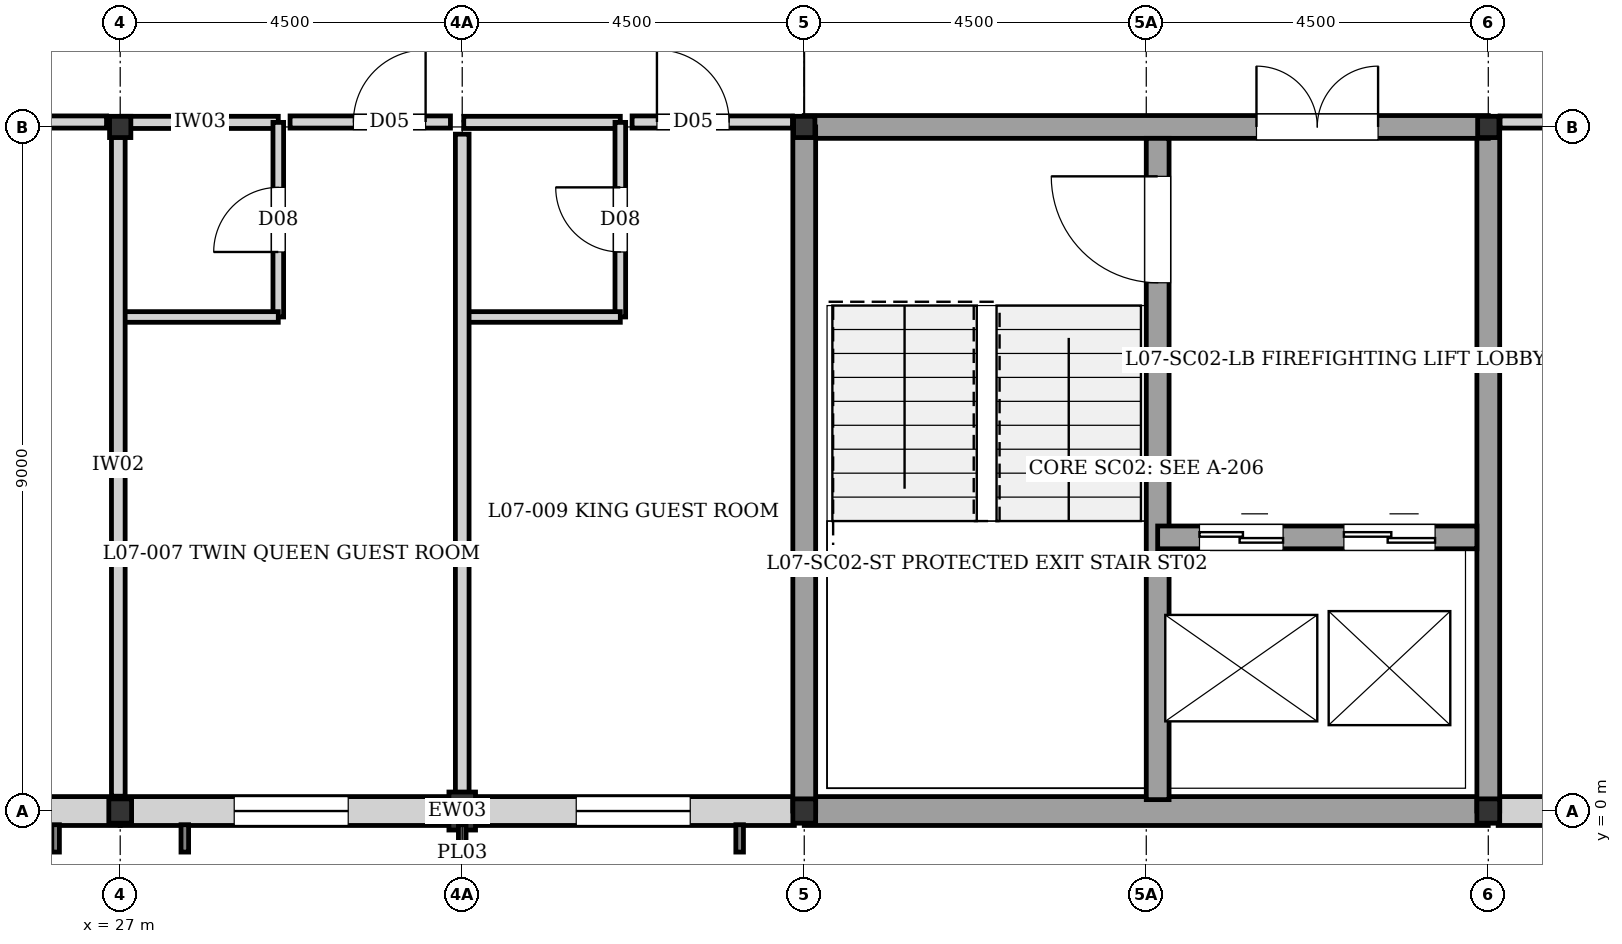
"""IFC4 building model, lengths in metres.
Left out: names, types, materials, properties, quantities, classifications, styles, units other than length and angle.
Written with IfcOpenShell. Run it as: python <this file> out.ifc"""

import sys

from ifc_helpers import new_model, si_unit, direction, frame, frame_2d, origin, origin_2d, place, context, subcontext, project, spatial, rectangle, i_section, extrude, element, fill, save


model = new_model("IFC4")
c1 = context("Model", 3, precision=1e-05, world=origin(), true_north=direction((0.0, 1.0)))
c2 = subcontext(c1, "Body", "Model", "MODEL_VIEW")
j1 = project(units=[si_unit("LENGTHUNIT", "METRE"), si_unit("PLANEANGLEUNIT", "RADIAN")], contexts=[c1])
p1 = place(None, origin())
s1 = spatial("IfcSite", under=j1, at=p1, CompositionType="ELEMENT")
p2 = place(p1, origin())
s2 = spatial("IfcBuilding", under=s1, at=p2, CompositionType="ELEMENT")
p3 = place(p2, frame((0.0, 0.0, 23.68)))
s3 = spatial("IfcBuildingStorey", under=s2, at=p3, CompositionType="ELEMENT", Elevation=23.68)
p4 = place(p3, frame((27.0, 0.0, 0.0), z_axis=(0.0, 0.0, 1.0), x_axis=(1.0, 0.0, 0.0)))
e1 = element("IfcColumn", 1, at=p4, inside=s3, PredefinedType="COLUMN", context=c2, shape_type="SweptSolid", body=[
    extrude(i_section(OverallWidth=0.3, OverallDepth=0.32, WebThickness=0.011, FlangeThickness=0.021, at=origin_2d()), origin(), (0.0, 0.0, 1.0), 3.2),
])
p5 = place(p3, frame((27.0, 9.0, 0.0), z_axis=(0.0, 0.0, 1.0), x_axis=(1.0, 0.0, 0.0)))
e2 = element("IfcColumn", 2, at=p5, inside=s3, PredefinedType="COLUMN", context=c2, shape_type="SweptSolid", body=[
    extrude(i_section(OverallWidth=0.28, OverallDepth=0.28, WebThickness=0.01, FlangeThickness=0.018, at=origin_2d()), origin(), (0.0, 0.0, 1.0), 3.2),
])
p6 = place(p3, frame((36.0, 0.0, 0.0), z_axis=(0.0, 0.0, 1.0), x_axis=(1.0, 0.0, 0.0)))
e3 = element("IfcColumn", 3, at=p6, inside=s3, PredefinedType="COLUMN", context=c2, shape_type="SweptSolid", body=[
    extrude(i_section(OverallWidth=0.3, OverallDepth=0.32, WebThickness=0.011, FlangeThickness=0.021, at=origin_2d()), origin(), (0.0, 0.0, 1.0), 3.2),
])
p7 = place(p3, frame((36.0, 9.0, 0.0), z_axis=(0.0, 0.0, 1.0), x_axis=(1.0, 0.0, 0.0)))
e4 = element("IfcColumn", 4, at=p7, inside=s3, PredefinedType="COLUMN", context=c2, shape_type="SweptSolid", body=[
    extrude(i_section(OverallWidth=0.28, OverallDepth=0.28, WebThickness=0.01, FlangeThickness=0.018, at=origin_2d()), origin(), (0.0, 0.0, 1.0), 3.2),
])
p8 = place(p3, frame((45.0, 0.0, 0.0), z_axis=(0.0, 0.0, 1.0), x_axis=(1.0, 0.0, 0.0)))
e5 = element("IfcColumn", 5, at=p8, inside=s3, PredefinedType="COLUMN", context=c2, shape_type="SweptSolid", body=[
    extrude(i_section(OverallWidth=0.3, OverallDepth=0.32, WebThickness=0.011, FlangeThickness=0.021, at=origin_2d()), origin(), (0.0, 0.0, 1.0), 3.2),
])
p9 = place(p3, frame((45.0, 9.0, 0.0), z_axis=(0.0, 0.0, 1.0), x_axis=(1.0, 0.0, 0.0)))
e6 = element("IfcColumn", 6, at=p9, inside=s3, PredefinedType="COLUMN", context=c2, shape_type="SweptSolid", body=[
    extrude(i_section(OverallWidth=0.28, OverallDepth=0.28, WebThickness=0.01, FlangeThickness=0.018, at=origin_2d()), origin(), (0.0, 0.0, 1.0), 3.2),
])
p10 = place(p3, frame((31.5, 0.0, 0.0), z_axis=(0.0, 0.0, 1.0), x_axis=(1.0, 0.0, 0.0)))
e7 = element("IfcColumn", 7, at=p10, inside=s3, PredefinedType="PILASTER", context=c2, shape_type="SweptSolid", body=[
    extrude(rectangle(XDim=0.35, YDim=0.5, at=origin_2d()), origin(), (0.0, 0.0, 1.0), 3.2),
])
p11 = place(p3, frame((54.0, 0.0, 0.0), z_axis=(0.0, 0.0, 1.0), x_axis=(-1.0, 0.0, 0.0)))
e8 = element("IfcWall", 8, at=p11, inside=s3, PredefinedType="SOLIDWALL", context=c2, shape_type="SweptSolid", body=[
    extrude(rectangle(XDim=8.87, YDim=0.38, at=frame_2d((4.435, 0.0))), origin(), (0.0, 0.0, 1.0), 2.6),
])
p12 = place(p11, frame((1.5, 0.0, 0.35)))
e9 = element("IfcOpeningElement", 9, at=p12, cuts=e8, PredefinedType="OPENING", context=c2, shape_type="SweptSolid", body=[
    extrude(rectangle(XDim=1.5, YDim=1.8, at=frame_2d((0.75, 0.9))), frame((0.0, 0.2, 0.0), z_axis=(0.0, -1.0, 0.0), x_axis=(1.0, 0.0, 0.0)), (0.0, 0.0, 1.0), 0.4),
])
p13 = place(p11, frame((6.0, 0.0, 0.35)))
e10 = element("IfcOpeningElement", 10, at=p13, cuts=e8, PredefinedType="OPENING", context=c2, shape_type="SweptSolid", body=[
    extrude(rectangle(XDim=1.5, YDim=1.8, at=frame_2d((0.75, 0.9))), frame((0.0, 0.2, 0.0), z_axis=(0.0, -1.0, 0.0), x_axis=(1.0, 0.0, 0.0)), (0.0, 0.0, 1.0), 0.4),
])
p14 = place(p3, frame((45.0, 0.0, 0.0), z_axis=(0.0, 0.0, 1.0), x_axis=(-1.0, 0.0, 0.0)))
e11 = element("IfcWall", 11, at=p14, inside=s3, PredefinedType="SOLIDWALL", context=c2, shape_type="SweptSolid", body=[
    extrude(rectangle(XDim=9.0, YDim=0.38, at=frame_2d((4.5, 0.0))), origin(), (0.0, 0.0, 1.0), 2.96),
])
p15 = place(p3, frame((35.87, 0.0, 0.0), z_axis=(0.0, 0.0, 1.0), x_axis=(-1.0, 0.0, 0.0)))
e12 = element("IfcWall", 12, at=p15, inside=s3, PredefinedType="SOLIDWALL", context=c2, shape_type="SweptSolid", body=[
    extrude(rectangle(XDim=8.87, YDim=0.38, at=frame_2d((4.435, 0.0))), origin(), (0.0, 0.0, 1.0), 2.73),
])
p16 = place(p15, frame((1.37, 0.0, 0.35)))
e13 = element("IfcOpeningElement", 13, at=p16, cuts=e12, PredefinedType="OPENING", context=c2, shape_type="SweptSolid", body=[
    extrude(rectangle(XDim=1.5, YDim=1.8, at=frame_2d((0.75, 0.9))), frame((0.0, 0.2, 0.0), z_axis=(0.0, -1.0, 0.0), x_axis=(1.0, 0.0, 0.0)), (0.0, 0.0, 1.0), 0.4),
])
p17 = place(p15, frame((5.87, 0.0, 0.35)))
e14 = element("IfcOpeningElement", 14, at=p17, cuts=e12, PredefinedType="OPENING", context=c2, shape_type="SweptSolid", body=[
    extrude(rectangle(XDim=1.5, YDim=1.8, at=frame_2d((0.75, 0.9))), frame((0.0, 0.2, 0.0), z_axis=(0.0, -1.0, 0.0), x_axis=(1.0, 0.0, 0.0)), (0.0, 0.0, 1.0), 0.4),
])
p18 = place(p3, frame((27.0, 0.0, 0.0), z_axis=(0.0, 0.0, 1.0), x_axis=(-1.0, 0.0, 0.0)))
e15 = element("IfcWall", 15, at=p18, inside=s3, PredefinedType="SOLIDWALL", context=c2, shape_type="SweptSolid", body=[
    extrude(rectangle(XDim=8.87, YDim=0.38, at=frame_2d((4.435, 0.0))), origin(), (0.0, 0.0, 1.0), 2.56),
])
p19 = place(p18, frame((1.5, 0.0, 0.35)))
e16 = element("IfcOpeningElement", 16, at=p19, cuts=e15, PredefinedType="OPENING", context=c2, shape_type="SweptSolid", body=[
    extrude(rectangle(XDim=1.5, YDim=1.8, at=frame_2d((0.75, 0.9))), frame((0.0, 0.2, 0.0), z_axis=(0.0, -1.0, 0.0), x_axis=(1.0, 0.0, 0.0)), (0.0, 0.0, 1.0), 0.4),
])
p20 = place(p18, frame((6.0, 0.0, 0.35)))
e17 = element("IfcOpeningElement", 17, at=p20, cuts=e15, PredefinedType="OPENING", context=c2, shape_type="SweptSolid", body=[
    extrude(rectangle(XDim=1.5, YDim=1.8, at=frame_2d((0.75, 0.9))), frame((0.0, 0.2, 0.0), z_axis=(0.0, -1.0, 0.0), x_axis=(1.0, 0.0, 0.0)), (0.0, 0.0, 1.0), 0.4),
])
p21 = place(p3, frame((45.0, 0.0, 0.0), z_axis=(0.0, 0.0, 1.0), x_axis=(0.0, 1.0, 0.0)))
e18 = element("IfcWall", 18, at=p21, inside=s3, PredefinedType="SHEAR", context=c2, shape_type="SweptSolid", body=[
    extrude(rectangle(XDim=9.0, YDim=0.3, at=frame_2d((4.5, 0.0))), origin(), (0.0, 0.0, 1.0), 2.96),
])
p22 = place(p3, frame((36.0, 9.0, 0.0), z_axis=(0.0, 0.0, 1.0), x_axis=(1.0, 0.0, 0.0)))
e19 = element("IfcWall", 19, at=p22, inside=s3, PredefinedType="SHEAR", context=c2, shape_type="SweptSolid", body=[
    extrude(rectangle(XDim=9.0, YDim=0.3, at=frame_2d((4.5, 0.0))), origin(), (0.0, 0.0, 1.0), 2.96),
])
p23 = place(p22, frame((5.95, 0.0, 0.0)))
e20 = element("IfcOpeningElement", 20, at=p23, cuts=e19, PredefinedType="OPENING", context=c2, shape_type="SweptSolid", body=[
    extrude(rectangle(XDim=1.6, YDim=2.1, at=frame_2d((0.8, 1.05))), frame((0.0, 0.16, 0.0), z_axis=(0.0, -1.0, 0.0), x_axis=(1.0, 0.0, 0.0)), (0.0, 0.0, 1.0), 0.32),
])
p24 = place(p3, frame((36.0, 0.0, 0.0), z_axis=(0.0, 0.0, 1.0), x_axis=(0.0, 1.0, 0.0)))
e21 = element("IfcWall", 21, at=p24, inside=s3, PredefinedType="SHEAR", context=c2, shape_type="SweptSolid", body=[
    extrude(rectangle(XDim=9.0, YDim=0.3, at=frame_2d((4.5, 0.0))), origin(), (0.0, 0.0, 1.0), 2.96),
])
p25 = place(p3, frame((40.65, 0.15, 0.0), z_axis=(0.0, 0.0, 1.0), x_axis=(0.0, 1.0, 0.0)))
e22 = element("IfcWall", 22, at=p25, inside=s3, PredefinedType="SHEAR", context=c2, shape_type="SweptSolid", body=[
    extrude(rectangle(XDim=8.7, YDim=0.3, at=frame_2d((4.35, 0.0))), origin(), (0.0, 0.0, 1.0), 2.96),
])
p26 = place(p25, frame((6.8, 0.0, 0.0)))
e23 = element("IfcOpeningElement", 23, at=p26, cuts=e22, PredefinedType="OPENING", context=c2, shape_type="SweptSolid", body=[
    extrude(rectangle(XDim=1.4, YDim=2.02, at=frame_2d((0.7, 1.01))), frame((0.0, 0.16, 0.0), z_axis=(0.0, -1.0, 0.0), x_axis=(1.0, 0.0, 0.0)), (0.0, 0.0, 1.0), 0.32),
])
p27 = place(p3, frame((40.65, 3.6, 0.0), z_axis=(0.0, 0.0, 1.0), x_axis=(1.0, 0.0, 0.0)))
e24 = element("IfcWall", 24, at=p27, inside=s3, PredefinedType="SHEAR", context=c2, shape_type="SweptSolid", body=[
    extrude(rectangle(XDim=4.2, YDim=0.3, at=frame_2d((2.1, 0.0))), origin(), (0.0, 0.0, 1.0), 2.96),
])
p28 = place(p27, frame((0.55, 0.0, 0.0)))
e25 = element("IfcOpeningElement", 25, at=p28, cuts=e24, PredefinedType="OPENING", context=c2, shape_type="SweptSolid", body=[
    extrude(rectangle(XDim=1.1, YDim=2.1, at=frame_2d((0.55, 1.05))), frame((0.0, 0.16, 0.0), z_axis=(0.0, -1.0, 0.0), x_axis=(1.0, 0.0, 0.0)), (0.0, 0.0, 1.0), 0.32),
])
p29 = place(p27, frame((2.45, 0.0, 0.0)))
e26 = element("IfcOpeningElement", 26, at=p29, cuts=e24, PredefinedType="OPENING", context=c2, shape_type="SweptSolid", body=[
    extrude(rectangle(XDim=1.2, YDim=2.2, at=frame_2d((0.6, 1.1))), frame((0.0, 0.16, 0.0), z_axis=(0.0, -1.0, 0.0), x_axis=(1.0, 0.0, 0.0)), (0.0, 0.0, 1.0), 0.32),
])
p30 = place(p3, frame((27.02, 9.06, 0.0), z_axis=(0.0, 0.0, 1.0), x_axis=(1.0, 0.0, 0.0)))
e27 = element("IfcWall", 27, at=p30, inside=s3, PredefinedType="PARTITIONING", context=c2, shape_type="SweptSolid", body=[
    extrude(rectangle(XDim=2.06, YDim=0.16, at=frame_2d((1.03, 0.0))), origin(), (0.0, 0.0, 1.0), 2.56),
])
p31 = place(p3, frame((29.08, 6.5, 0.0), z_axis=(0.0, 0.0, 1.0), x_axis=(0.0, 1.0, 0.0)))
e28 = element("IfcWall", 28, at=p31, inside=s3, PredefinedType="PLUMBINGWALL", context=c2, shape_type="SweptSolid", body=[
    extrude(rectangle(XDim=2.56, YDim=0.14, at=frame_2d((1.28, 0.0))), origin(), (0.0, 0.0, 1.0), 2.96),
])
p32 = place(p31, frame((0.855, 0.0, 0.0)))
e29 = element("IfcOpeningElement", 29, at=p32, cuts=e28, PredefinedType="OPENING", context=c2, shape_type="SweptSolid", body=[
    extrude(rectangle(XDim=0.85, YDim=2.04, at=frame_2d((0.425, 1.02))), frame((0.0, 0.08, 0.0), z_axis=(0.0, -1.0, 0.0), x_axis=(1.0, 0.0, 0.0)), (0.0, 0.0, 1.0), 0.16),
])
p33 = place(p3, frame((27.02, 6.5, 0.0), z_axis=(0.0, 0.0, 1.0), x_axis=(1.0, 0.0, 0.0)))
e30 = element("IfcWall", 30, at=p33, inside=s3, PredefinedType="PLUMBINGWALL", context=c2, shape_type="SweptSolid", body=[
    extrude(rectangle(XDim=2.06, YDim=0.14, at=frame_2d((1.03, 0.0))), origin(), (0.0, 0.0, 1.0), 2.96),
])
p34 = place(p3, frame((31.52, 9.06, 0.0), z_axis=(0.0, 0.0, 1.0), x_axis=(1.0, 0.0, 0.0)))
e31 = element("IfcWall", 31, at=p34, inside=s3, PredefinedType="PARTITIONING", context=c2, shape_type="SweptSolid", body=[
    extrude(rectangle(XDim=2.06, YDim=0.16, at=frame_2d((1.03, 0.0))), origin(), (0.0, 0.0, 1.0), 2.56),
])
p35 = place(p3, frame((33.58, 6.5, 0.0), z_axis=(0.0, 0.0, 1.0), x_axis=(0.0, 1.0, 0.0)))
e32 = element("IfcWall", 32, at=p35, inside=s3, PredefinedType="PLUMBINGWALL", context=c2, shape_type="SweptSolid", body=[
    extrude(rectangle(XDim=2.56, YDim=0.14, at=frame_2d((1.28, 0.0))), origin(), (0.0, 0.0, 1.0), 2.96),
])
p36 = place(p35, frame((0.855, 0.0, 0.0)))
e33 = element("IfcOpeningElement", 33, at=p36, cuts=e32, PredefinedType="OPENING", context=c2, shape_type="SweptSolid", body=[
    extrude(rectangle(XDim=0.85, YDim=2.04, at=frame_2d((0.425, 1.02))), frame((0.0, 0.08, 0.0), z_axis=(0.0, -1.0, 0.0), x_axis=(1.0, 0.0, 0.0)), (0.0, 0.0, 1.0), 0.16),
])
p37 = place(p3, frame((31.52, 6.5, 0.0), z_axis=(0.0, 0.0, 1.0), x_axis=(1.0, 0.0, 0.0)))
e34 = element("IfcWall", 34, at=p37, inside=s3, PredefinedType="PLUMBINGWALL", context=c2, shape_type="SweptSolid", body=[
    extrude(rectangle(XDim=2.06, YDim=0.14, at=frame_2d((1.03, 0.0))), origin(), (0.0, 0.0, 1.0), 2.96),
])
p38 = place(p3, frame((26.975, 0.195, 0.0), z_axis=(0.0, 0.0, 1.0), x_axis=(0.0, 1.0, 0.0)))
e35 = element("IfcWall", 35, at=p38, inside=s3, PredefinedType="PARTITIONING", context=c2, shape_type="SweptSolid", body=[
    extrude(rectangle(XDim=8.71, YDim=0.18, at=frame_2d((4.355, 0.0))), origin(), (0.0, 0.0, 1.0), 2.37),
])
p39 = place(p3, frame((31.5, 0.195, 0.0), z_axis=(0.0, 0.0, 1.0), x_axis=(0.0, 1.0, 0.0)))
e36 = element("IfcWall", 36, at=p39, inside=s3, PredefinedType="PARTITIONING", context=c2, shape_type="SweptSolid", body=[
    extrude(rectangle(XDim=8.71, YDim=0.18, at=frame_2d((4.355, 0.0))), origin(), (0.0, 0.0, 1.0), 2.96),
])
p40 = place(p3, frame((20.285, 9.065, 0.0), z_axis=(0.0, 0.0, 1.0), x_axis=(1.0, 0.0, 0.0)))
e37 = element("IfcWall", 37, at=p40, inside=s3, PredefinedType="PARTITIONING", context=c2, shape_type="SweptSolid", body=[
    extrude(rectangle(XDim=6.535, YDim=0.16, at=frame_2d((3.268, 0.0))), origin(), (0.0, 0.0, 1.0), 2.6),
])
p41 = place(p40, frame((1.75, 0.0, 0.0)))
e38 = element("IfcOpeningElement", 38, at=p41, cuts=e37, PredefinedType="OPENING", context=c2, shape_type="SweptSolid", body=[
    extrude(rectangle(XDim=1.3, YDim=2.25, at=frame_2d((0.65, 1.125))), frame((0.0, 0.09, 0.0), z_axis=(0.0, -1.0, 0.0), x_axis=(1.0, 0.0, 0.0)), (0.0, 0.0, 1.0), 0.18),
])
p42 = place(p3, frame((29.235, 9.065, 0.0), z_axis=(0.0, 0.0, 1.0), x_axis=(1.0, 0.0, 0.0)))
e39 = element("IfcWall", 39, at=p42, inside=s3, PredefinedType="PARTITIONING", context=c2, shape_type="SweptSolid", body=[
    extrude(rectangle(XDim=2.11, YDim=0.16, at=frame_2d((1.055, 0.0))), origin(), (0.0, 0.0, 1.0), 2.56),
])
p43 = place(p42, frame((0.833, 0.0, 0.0)))
e40 = element("IfcOpeningElement", 40, at=p43, cuts=e39, PredefinedType="OPENING", context=c2, shape_type="SweptSolid", body=[
    extrude(rectangle(XDim=0.95, YDim=2.15, at=frame_2d((0.475, 1.075))), frame((0.0, 0.09, 0.0), z_axis=(0.0, -1.0, 0.0), x_axis=(1.0, 0.0, 0.0)), (0.0, 0.0, 1.0), 0.18),
])
p44 = place(p3, frame((33.735, 9.065, 0.0), z_axis=(0.0, 0.0, 1.0), x_axis=(1.0, 0.0, 0.0)))
e41 = element("IfcWall", 41, at=p44, inside=s3, PredefinedType="PARTITIONING", context=c2, shape_type="SweptSolid", body=[
    extrude(rectangle(XDim=2.11, YDim=0.16, at=frame_2d((1.055, 0.0))), origin(), (0.0, 0.0, 1.0), 2.56),
])
p45 = place(p44, frame((0.327, 0.0, 0.0)))
e42 = element("IfcOpeningElement", 42, at=p45, cuts=e41, PredefinedType="OPENING", context=c2, shape_type="SweptSolid", body=[
    extrude(rectangle(XDim=0.95, YDim=2.15, at=frame_2d((0.475, 1.075))), frame((0.0, 0.09, 0.0), z_axis=(0.0, -1.0, 0.0), x_axis=(1.0, 0.0, 0.0)), (0.0, 0.0, 1.0), 0.18),
])
p46 = place(p3, frame((45.155, 9.065, 0.0), z_axis=(0.0, 0.0, 1.0), x_axis=(1.0, 0.0, 0.0)))
e43 = element("IfcWall", 43, at=p46, inside=s3, PredefinedType="PARTITIONING", context=c2, shape_type="SweptSolid", body=[
    extrude(rectangle(XDim=8.67, YDim=0.16, at=frame_2d((4.335, 0.0))), origin(), (0.0, 0.0, 1.0), 2.46),
])
p47 = place(p46, frame((3.835, 0.0, 0.0)))
e44 = element("IfcOpeningElement", 44, at=p47, cuts=e43, PredefinedType="OPENING", context=c2, shape_type="SweptSolid", body=[
    extrude(rectangle(XDim=1.0, YDim=2.1, at=frame_2d((0.5, 1.05))), frame((0.0, 0.09, 0.0), z_axis=(0.0, -1.0, 0.0), x_axis=(1.0, 0.0, 0.0)), (0.0, 0.0, 1.0), 0.18),
])
p48 = place(p16, origin())
e45 = element("IfcWindow", 45, at=p48, inside=s3, PartitioningType="SINGLE_PANEL", PredefinedType="WINDOW", context=c2, shape_type="SweptSolid", body=[
    extrude(rectangle(XDim=1.5, YDim=1.8, at=frame_2d((0.75, 0.9))), frame((0.0, 0.03, 0.0), z_axis=(0.0, -1.0, 0.0), x_axis=(1.0, 0.0, 0.0)), (0.0, 0.0, 1.0), 0.06),
])
fill(e13, e45)
p49 = place(p17, origin())
e46 = element("IfcWindow", 46, at=p49, inside=s3, PartitioningType="SINGLE_PANEL", PredefinedType="WINDOW", context=c2, shape_type="SweptSolid", body=[
    extrude(rectangle(XDim=1.5, YDim=1.8, at=frame_2d((0.75, 0.9))), frame((0.0, 0.03, 0.0), z_axis=(0.0, -1.0, 0.0), x_axis=(1.0, 0.0, 0.0)), (0.0, 0.0, 1.0), 0.06),
])
fill(e14, e46)
p50 = place(p23, origin())
e47 = element("IfcDoor", 47, at=p50, inside=s3, OperationType="DOUBLE_DOOR_SINGLE_SWING", PredefinedType="DOOR", context=c2, shape_type="SweptSolid", body=[
    extrude(rectangle(XDim=1.6, YDim=2.1, at=frame_2d((0.8, 1.05))), frame((0.0, 0.025, 0.0), z_axis=(0.0, -1.0, 0.0), x_axis=(1.0, 0.0, 0.0)), (0.0, 0.0, 1.0), 0.05),
])
fill(e20, e47)
p51 = place(p26, origin())
e48 = element("IfcDoor", 48, at=p51, inside=s3, OperationType="SINGLE_SWING_RIGHT", PredefinedType="DOOR", context=c2, shape_type="SweptSolid", body=[
    extrude(rectangle(XDim=1.4, YDim=2.02, at=frame_2d((0.7, 1.01))), frame((0.0, 0.025, 0.0), z_axis=(0.0, -1.0, 0.0), x_axis=(1.0, 0.0, 0.0)), (0.0, 0.0, 1.0), 0.05),
])
fill(e23, e48)
p52 = place(p28, origin())
e49 = element("IfcDoor", 49, at=p52, inside=s3, OperationType="DOUBLE_DOOR_SLIDING", PredefinedType="DOOR", context=c2, shape_type="SweptSolid", body=[
    extrude(rectangle(XDim=1.1, YDim=2.1, at=frame_2d((0.55, 1.05))), frame((0.0, 0.025, 0.0), z_axis=(0.0, -1.0, 0.0), x_axis=(1.0, 0.0, 0.0)), (0.0, 0.0, 1.0), 0.05),
])
fill(e25, e49)
p53 = place(p29, origin())
e50 = element("IfcDoor", 50, at=p53, inside=s3, OperationType="DOUBLE_DOOR_SLIDING", PredefinedType="DOOR", context=c2, shape_type="SweptSolid", body=[
    extrude(rectangle(XDim=1.2, YDim=2.2, at=frame_2d((0.6, 1.1))), frame((0.0, 0.025, 0.0), z_axis=(0.0, -1.0, 0.0), x_axis=(1.0, 0.0, 0.0)), (0.0, 0.0, 1.0), 0.05),
])
fill(e26, e50)
p54 = place(p32, origin())
e51 = element("IfcDoor", 51, at=p54, inside=s3, OperationType="SINGLE_SWING_LEFT", PredefinedType="DOOR", context=c2, shape_type="SweptSolid", body=[
    extrude(rectangle(XDim=0.85, YDim=2.04, at=frame_2d((0.425, 1.02))), frame((0.0, 0.025, 0.0), z_axis=(0.0, -1.0, 0.0), x_axis=(1.0, 0.0, 0.0)), (0.0, 0.0, 1.0), 0.05),
])
fill(e29, e51)
p55 = place(p36, origin())
e52 = element("IfcDoor", 52, at=p55, inside=s3, OperationType="SINGLE_SWING_RIGHT", PredefinedType="DOOR", context=c2, shape_type="SweptSolid", body=[
    extrude(rectangle(XDim=0.85, YDim=2.04, at=frame_2d((0.425, 1.02))), frame((0.0, 0.025, 0.0), z_axis=(0.0, -1.0, 0.0), x_axis=(1.0, 0.0, 0.0)), (0.0, 0.0, 1.0), 0.05),
])
fill(e33, e52)
p56 = place(p43, origin())
e53 = element("IfcDoor", 53, at=p56, inside=s3, OperationType="SINGLE_SWING_RIGHT", PredefinedType="DOOR", context=c2, shape_type="SweptSolid", body=[
    extrude(rectangle(XDim=0.95, YDim=2.15, at=frame_2d((0.475, 1.075))), frame((0.0, 0.025, 0.0), z_axis=(0.0, -1.0, 0.0), x_axis=(1.0, 0.0, 0.0)), (0.0, 0.0, 1.0), 0.05),
])
fill(e40, e53)
p57 = place(p45, origin())
e54 = element("IfcDoor", 54, at=p57, inside=s3, OperationType="SINGLE_SWING_LEFT", PredefinedType="DOOR", context=c2, shape_type="SweptSolid", body=[
    extrude(rectangle(XDim=0.95, YDim=2.15, at=frame_2d((0.475, 1.075))), frame((0.0, 0.025, 0.0), z_axis=(0.0, -1.0, 0.0), x_axis=(1.0, 0.0, 0.0)), (0.0, 0.0, 1.0), 0.05),
])
fill(e42, e54)
save(model, sys.argv[1])
